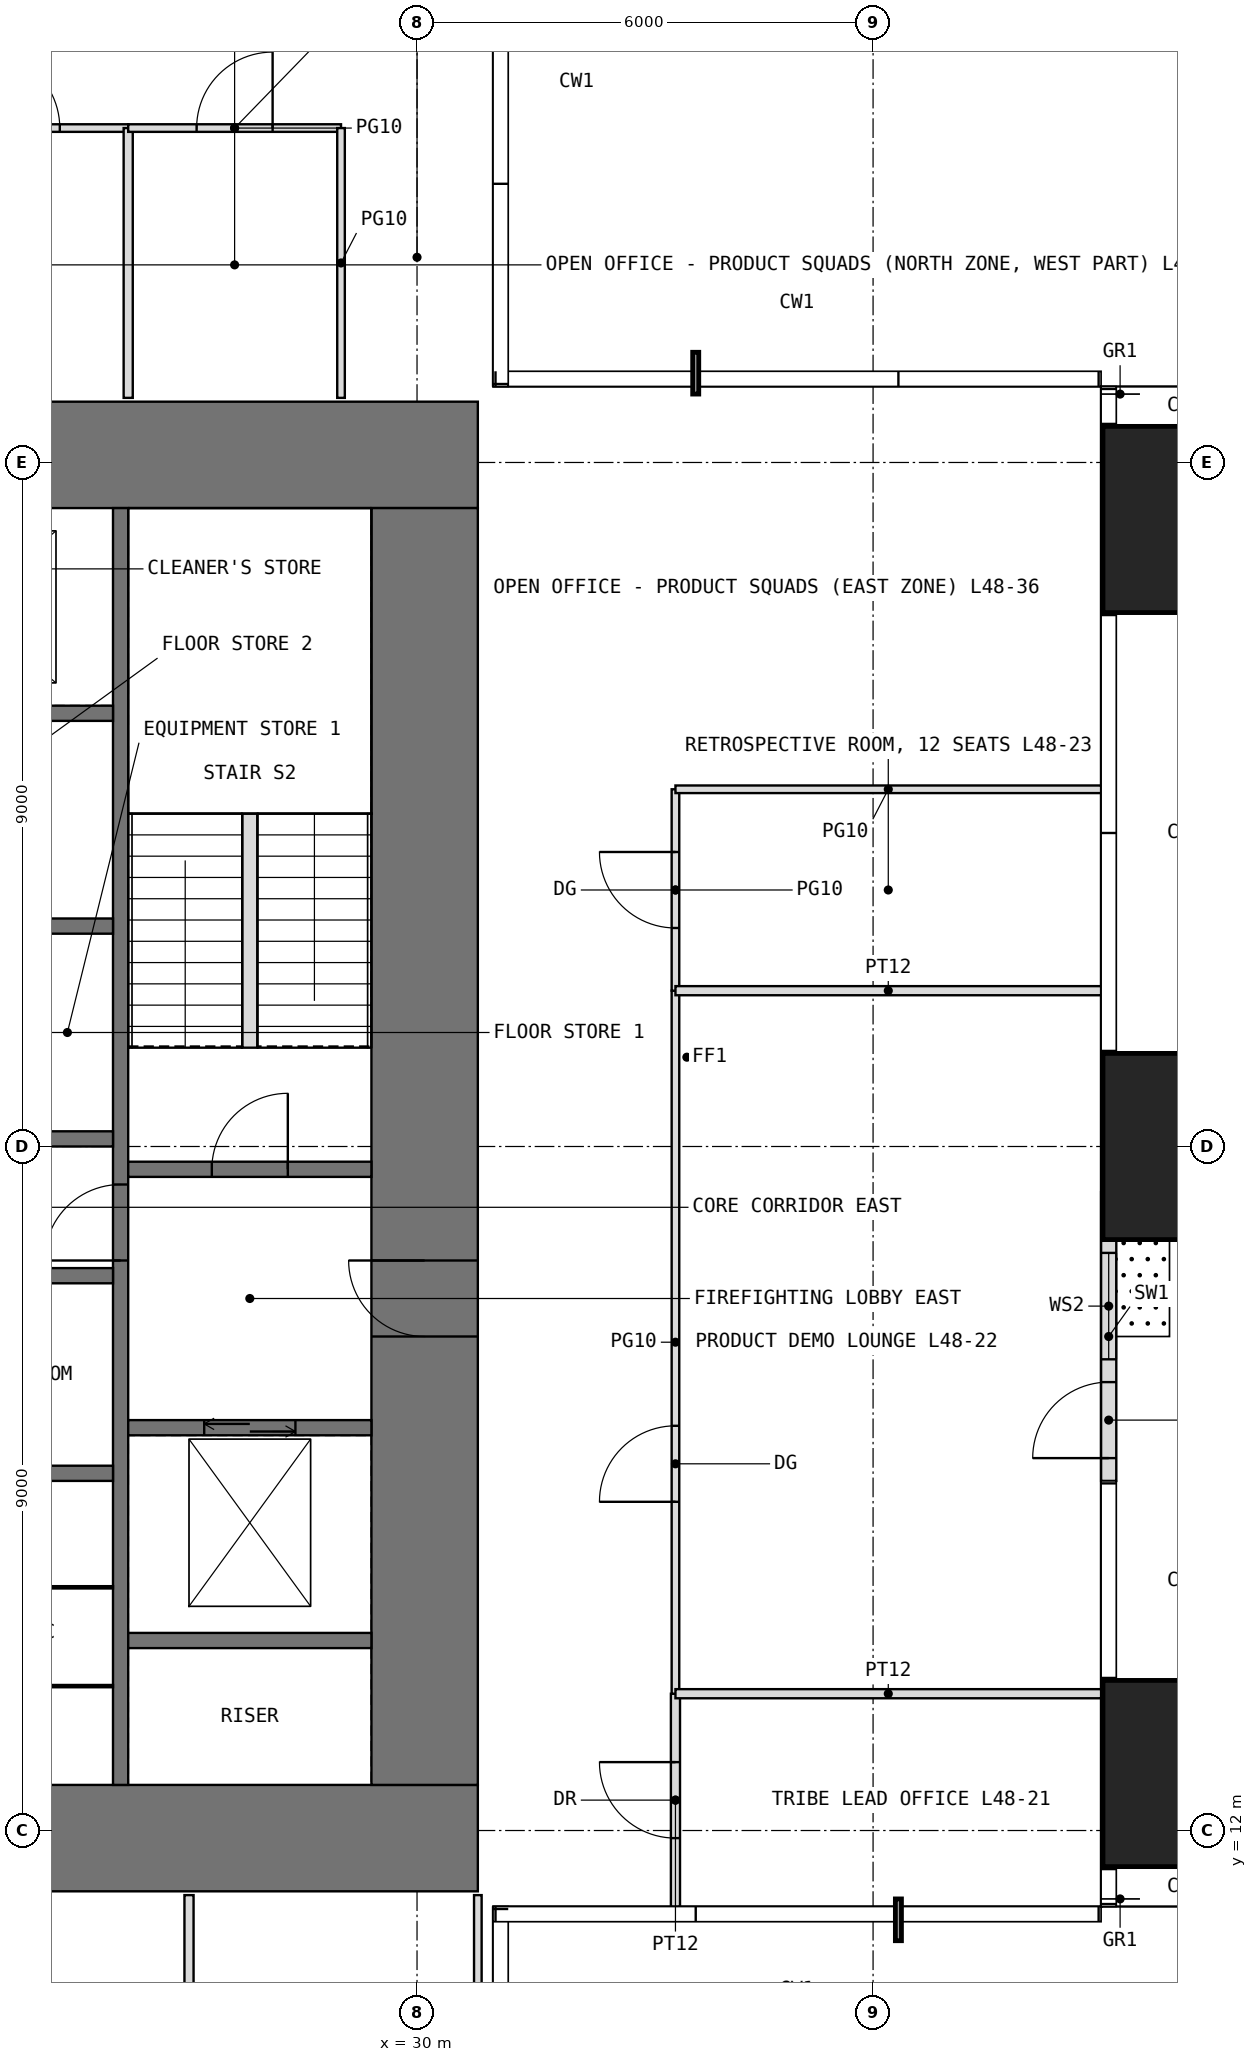
"""IFC4 building model, lengths in metres.
Left out: names, types, materials, properties, quantities, classifications, styles, units other than length and angle.
Written with IfcOpenShell. Run it as: python <this file> out.ifc"""

import sys

from ifc_helpers import new_model, si_unit, direction, frame, frame_2d, origin, origin_2d, place, context, subcontext, project, spatial, rectangle, extrude, element, fill, save


model = new_model("IFC4")
c1 = context("Model", 3, precision=1e-05, world=origin(), true_north=direction((0.0, 1.0)))
c2 = subcontext(c1, "Body", "Model", "MODEL_VIEW")
j1 = project(units=[si_unit("LENGTHUNIT", "METRE"), si_unit("PLANEANGLEUNIT", "RADIAN")], contexts=[c1])
p1 = place(None, origin())
s1 = spatial("IfcSite", under=j1, at=p1, CompositionType="ELEMENT")
p2 = place(p1, origin())
s2 = spatial("IfcBuilding", under=s1, at=p2, CompositionType="ELEMENT")
p3 = place(p2, frame((0.0, 0.0, 202.5)))
s3 = spatial("IfcBuildingStorey", under=s2, at=p3, CompositionType="ELEMENT", Elevation=202.5)
for number, where, z_axis, x_axis in (
    (1, (40.25, 12.75, 0.0), (0.0, 0.0, 1.0), (1.0, 0.0, 0.0)),
    (2, (40.25, 21.0, 0.0), (0.0, 0.0, 1.0), (1.0, 0.0, 0.0)),
    (3, (40.25, 29.25, 0.0), (0.0, 0.0, 1.0), (1.0, 0.0, 0.0)),
):
    element("IfcColumn", number, at=place(p3, frame(where, z_axis=z_axis, x_axis=x_axis)), inside=s3, PredefinedType="COLUMN", context=c2, shape_type="SweptSolid", body=[
        extrude(rectangle(XDim=2.45, YDim=2.45, at=origin_2d()), origin(), (0.0, 0.0, 1.0), 4.0),
    ])
p4 = place(p3, frame((39.1, 16.6, 0.0), z_axis=(0.0, 0.0, 1.0), x_axis=(0.0, 1.0, 0.0)))
e4 = element("IfcWall", 4, at=p4, inside=s3, PredefinedType="USERDEFINED", context=c2, shape_type="SweptSolid", body=[
    extrude(rectangle(XDim=3.8, YDim=0.2, at=frame_2d((1.9, 0.0))), origin(), (0.0, 0.0, 1.0), 3.75),
])
p5 = place(p4, frame((0.3, 0.0, 0.0)))
e5 = element("IfcOpeningElement", 5, at=p5, cuts=e4, PredefinedType="OPENING", context=c2, shape_type="SweptSolid", body=[
    extrude(rectangle(XDim=1.0, YDim=2.4, at=frame_2d((0.5, 1.2))), frame((0.0, 0.11, 0.0), z_axis=(0.0, -1.0, 0.0), x_axis=(1.0, 0.0, 0.0)), (0.0, 0.0, 1.0), 0.22),
])
p6 = place(p4, frame((1.6, 0.0, 0.3)))
e6 = element("IfcOpeningElement", 6, at=p6, cuts=e4, PredefinedType="OPENING", context=c2, shape_type="SweptSolid", body=[
    extrude(rectangle(XDim=1.4, YDim=2.7, at=frame_2d((0.7, 1.35))), frame((0.0, 0.11, 0.0), z_axis=(0.0, -1.0, 0.0), x_axis=(1.0, 0.0, 0.0)), (0.0, 0.0, 1.0), 0.22),
])
p7 = place(p3, frame((11.2, 11.9, -0.05), z_axis=(0.0, 0.0, 1.0), x_axis=(1.0, 0.0, 0.0)))
e7 = element("IfcWall", 7, at=p7, inside=s3, PredefinedType="SHEAR", context=c2, shape_type="SweptSolid", body=[
    extrude(rectangle(XDim=19.6, YDim=1.4, at=frame_2d((9.8, 0.0))), origin(), (0.0, 0.0, 1.0), 4.0),
])
p8 = place(p7, frame((8.8, 0.0, 0.05)))
e8 = element("IfcOpeningElement", 8, at=p8, cuts=e7, PredefinedType="OPENING", context=c2, shape_type="SweptSolid", body=[
    extrude(rectangle(XDim=2.0, YDim=2.2, at=frame_2d((1.0, 1.1))), frame((0.0, 0.71, 0.0), z_axis=(0.0, -1.0, 0.0), x_axis=(1.0, 0.0, 0.0)), (0.0, 0.0, 1.0), 1.42),
])
p9 = place(p3, frame((11.2, 30.1, -0.05), z_axis=(0.0, 0.0, 1.0), x_axis=(1.0, 0.0, 0.0)))
e9 = element("IfcWall", 9, at=p9, inside=s3, PredefinedType="SHEAR", context=c2, shape_type="SweptSolid", body=[
    extrude(rectangle(XDim=19.6, YDim=1.4, at=frame_2d((9.8, 0.0))), origin(), (0.0, 0.0, 1.0), 4.0),
])
p10 = place(p9, frame((8.8, 0.0, 0.05)))
e10 = element("IfcOpeningElement", 10, at=p10, cuts=e9, PredefinedType="OPENING", context=c2, shape_type="SweptSolid", body=[
    extrude(rectangle(XDim=2.0, YDim=2.2, at=frame_2d((1.0, 1.1))), frame((0.0, 0.71, 0.0), z_axis=(0.0, -1.0, 0.0), x_axis=(1.0, 0.0, 0.0)), (0.0, 0.0, 1.0), 1.42),
])
p11 = place(p3, frame((30.1, 12.6, -0.05), z_axis=(0.0, 0.0, 1.0), x_axis=(0.0, 1.0, 0.0)))
e11 = element("IfcWall", 11, at=p11, inside=s3, PredefinedType="SHEAR", context=c2, shape_type="SweptSolid", body=[
    extrude(rectangle(XDim=16.8, YDim=1.4, at=frame_2d((8.4, 0.0))), origin(), (0.0, 0.0, 1.0), 4.0),
])
p12 = place(p11, frame((5.9, 0.0, 0.05)))
e12 = element("IfcOpeningElement", 12, at=p12, cuts=e11, PredefinedType="OPENING", context=c2, shape_type="SweptSolid", body=[
    extrude(rectangle(XDim=1.0, YDim=2.2, at=frame_2d((0.5, 1.1))), frame((0.0, 0.71, 0.0), z_axis=(0.0, -1.0, 0.0), x_axis=(1.0, 0.0, 0.0)), (0.0, 0.0, 1.0), 1.42),
])
p13 = place(p3, frame((26.1, 12.6, -0.05), z_axis=(0.0, 0.0, 1.0), x_axis=(0.0, 1.0, 0.0)))
e13 = element("IfcWall", 13, at=p13, inside=s3, PredefinedType="SHEAR", context=c2, shape_type="SweptSolid", body=[
    extrude(rectangle(XDim=16.8, YDim=0.2, at=frame_2d((8.4, 0.0))), origin(), (0.0, 0.0, 1.0), 4.0),
])
p14 = place(p13, frame((6.9, 0.0, 0.05)))
e14 = element("IfcOpeningElement", 14, at=p14, cuts=e13, PredefinedType="OPENING", context=c2, shape_type="SweptSolid", body=[
    extrude(rectangle(XDim=1.0, YDim=2.2, at=frame_2d((0.5, 1.1))), frame((0.0, 0.11, 0.0), z_axis=(0.0, -1.0, 0.0), x_axis=(1.0, 0.0, 0.0)), (0.0, 0.0, 1.0), 0.22),
])
for number, where, z_axis, x_axis in (
    (15, (22.8, 16.7, -0.05), (0.0, 0.0, 1.0), (1.0, 0.0, 0.0)),
    (16, (22.8, 19.3, -0.05), (0.0, 0.0, 1.0), (1.0, 0.0, 0.0)),
    (17, (22.8, 21.1, -0.05), (0.0, 0.0, 1.0), (1.0, 0.0, 0.0)),
    (18, (22.8, 23.9, -0.05), (0.0, 0.0, 1.0), (1.0, 0.0, 0.0)),
    (19, (22.8, 26.7, -0.05), (0.0, 0.0, 1.0), (1.0, 0.0, 0.0)),
    (20, (26.2, 14.5, -0.05), (0.0, 0.0, 1.0), (1.0, 0.0, 0.0)),
):
    element("IfcWall", number, at=place(p3, frame(where, z_axis=z_axis, x_axis=x_axis)), inside=s3, PredefinedType="SHEAR", context=c2, shape_type="SweptSolid", body=[
        extrude(rectangle(XDim=3.2, YDim=0.2, at=frame_2d((1.6, 0.0))), origin(), (0.0, 0.0, 1.0), 4.0),
    ])
p15 = place(p3, frame((26.2, 17.3, -0.05), z_axis=(0.0, 0.0, 1.0), x_axis=(1.0, 0.0, 0.0)))
e21 = element("IfcWall", 21, at=p15, inside=s3, PredefinedType="SHEAR", context=c2, shape_type="SweptSolid", body=[
    extrude(rectangle(XDim=3.2, YDim=0.2, at=frame_2d((1.6, 0.0))), origin(), (0.0, 0.0, 1.0), 4.0),
])
p16 = place(p15, frame((1.0, 0.0, 0.05)))
e22 = element("IfcOpeningElement", 22, at=p16, cuts=e21, PredefinedType="OPENING", context=c2, shape_type="SweptSolid", body=[
    extrude(rectangle(XDim=1.2, YDim=2.2, at=frame_2d((0.6, 1.1))), frame((0.0, 0.11, 0.0), z_axis=(0.0, -1.0, 0.0), x_axis=(1.0, 0.0, 0.0)), (0.0, 0.0, 1.0), 0.22),
])
p17 = place(p3, frame((26.2, 20.7, -0.05), z_axis=(0.0, 0.0, 1.0), x_axis=(1.0, 0.0, 0.0)))
e23 = element("IfcWall", 23, at=p17, inside=s3, PredefinedType="SHEAR", context=c2, shape_type="SweptSolid", body=[
    extrude(rectangle(XDim=3.2, YDim=0.2, at=frame_2d((1.6, 0.0))), origin(), (0.0, 0.0, 1.0), 4.0),
])
p18 = place(p17, frame((1.1, 0.0, 0.05)))
e24 = element("IfcOpeningElement", 24, at=p18, cuts=e23, PredefinedType="OPENING", context=c2, shape_type="SweptSolid", body=[
    extrude(rectangle(XDim=1.0, YDim=2.2, at=frame_2d((0.5, 1.1))), frame((0.0, 0.11, 0.0), z_axis=(0.0, -1.0, 0.0), x_axis=(1.0, 0.0, 0.0)), (0.0, 0.0, 1.0), 0.22),
])
for number, where, z_axis, x_axis in (
    (25, (24.6, 13.9, 0.0), (0.0, 0.0, 1.0), (1.0, 0.0, 0.0)),
    (26, (24.6, 15.2, 0.0), (0.0, 0.0, 1.0), (1.0, 0.0, 0.0)),
):
    element("IfcWall", number, at=place(p3, frame(where, z_axis=z_axis, x_axis=x_axis)), inside=s3, PredefinedType="PARTITIONING", context=c2, shape_type="SweptSolid", body=[
        extrude(rectangle(XDim=1.4, YDim=0.03, at=frame_2d((0.7, 0.0))), origin(), (0.0, 0.0, 1.0), 3.75),
    ])
p19 = place(p3, frame((23.4, 34.4, 0.0), z_axis=(0.0, 0.0, 1.0), x_axis=(1.0, 0.0, 0.0)))
e27 = element("IfcWall", 27, at=p19, inside=s3, PredefinedType="PARTITIONING", context=c2, shape_type="SweptSolid", body=[
    extrude(rectangle(XDim=2.8, YDim=0.1, at=frame_2d((1.4, 0.0))), origin(), (0.0, 0.0, 1.0), 3.75),
])
p20 = place(p19, frame((0.9, 0.0, 0.0)))
e28 = element("IfcOpeningElement", 28, at=p20, cuts=e27, PredefinedType="OPENING", context=c2, shape_type="SweptSolid", body=[
    extrude(rectangle(XDim=1.0, YDim=2.4, at=frame_2d((0.5, 1.2))), frame((0.0, 0.06, 0.0), z_axis=(0.0, -1.0, 0.0), x_axis=(1.0, 0.0, 0.0)), (0.0, 0.0, 1.0), 0.12),
])
p21 = place(p3, frame((26.2, 30.85, 0.0), z_axis=(0.0, 0.0, 1.0), x_axis=(0.0, 1.0, 0.0)))
e29 = element("IfcWall", 29, at=p21, inside=s3, PredefinedType="PARTITIONING", context=c2, shape_type="SweptSolid", body=[
    extrude(rectangle(XDim=3.55, YDim=0.12, at=frame_2d((1.775, 0.0))), origin(), (0.0, 0.0, 1.0), 3.75),
])
p22 = place(p3, frame((26.2, 34.4, 0.0), z_axis=(0.0, 0.0, 1.0), x_axis=(1.0, 0.0, 0.0)))
e30 = element("IfcWall", 30, at=p22, inside=s3, PredefinedType="PARTITIONING", context=c2, shape_type="SweptSolid", body=[
    extrude(rectangle(XDim=2.8, YDim=0.1, at=frame_2d((1.4, 0.0))), origin(), (0.0, 0.0, 1.0), 3.75),
])
p23 = place(p22, frame((0.9, 0.0, 0.0)))
e31 = element("IfcOpeningElement", 31, at=p23, cuts=e30, PredefinedType="OPENING", context=c2, shape_type="SweptSolid", body=[
    extrude(rectangle(XDim=1.0, YDim=2.4, at=frame_2d((0.5, 1.2))), frame((0.0, 0.06, 0.0), z_axis=(0.0, -1.0, 0.0), x_axis=(1.0, 0.0, 0.0)), (0.0, 0.0, 1.0), 0.12),
])
p24 = place(p3, frame((27.0, 6.8, 0.0), z_axis=(0.0, 0.0, 1.0), x_axis=(0.0, 1.0, 0.0)))
e32 = element("IfcWall", 32, at=p24, inside=s3, PredefinedType="PARTITIONING", context=c2, shape_type="SweptSolid", body=[
    extrude(rectangle(XDim=4.35, YDim=0.12, at=frame_2d((2.175, 0.0))), origin(), (0.0, 0.0, 1.0), 3.75),
])
p25 = place(p3, frame((29.0, 30.85, 0.0), z_axis=(0.0, 0.0, 1.0), x_axis=(0.0, 1.0, 0.0)))
e33 = element("IfcWall", 33, at=p25, inside=s3, PredefinedType="PARTITIONING", context=c2, shape_type="SweptSolid", body=[
    extrude(rectangle(XDim=3.55, YDim=0.1, at=frame_2d((1.775, 0.0))), origin(), (0.0, 0.0, 1.0), 3.75),
])
p26 = place(p3, frame((30.8, 6.8, 0.0), z_axis=(0.0, 0.0, 1.0), x_axis=(0.0, 1.0, 0.0)))
e34 = element("IfcWall", 34, at=p26, inside=s3, PredefinedType="PARTITIONING", context=c2, shape_type="SweptSolid", body=[
    extrude(rectangle(XDim=4.35, YDim=0.1, at=frame_2d((2.175, 0.0))), origin(), (0.0, 0.0, 1.0), 3.75),
])
p27 = place(p3, frame((33.4, 11.0, 0.0), z_axis=(0.0, 0.0, 1.0), x_axis=(0.0, 1.0, 0.0)))
e35 = element("IfcWall", 35, at=p27, inside=s3, PredefinedType="PARTITIONING", context=c2, shape_type="SweptSolid", body=[
    extrude(rectangle(XDim=2.8, YDim=0.12, at=frame_2d((1.4, 0.0))), origin(), (0.0, 0.0, 1.0), 3.75),
])
p28 = place(p27, frame((0.9, 0.0, 0.0)))
e36 = element("IfcOpeningElement", 36, at=p28, cuts=e35, PredefinedType="OPENING", context=c2, shape_type="SweptSolid", body=[
    extrude(rectangle(XDim=1.0, YDim=2.2, at=frame_2d((0.5, 1.1))), frame((0.0, 0.07, 0.0), z_axis=(0.0, -1.0, 0.0), x_axis=(1.0, 0.0, 0.0)), (0.0, 0.0, 1.0), 0.14),
])
p29 = place(p3, frame((33.4, 13.8, 0.0), z_axis=(0.0, 0.0, 1.0), x_axis=(0.0, 1.0, 0.0)))
e37 = element("IfcWall", 37, at=p29, inside=s3, PredefinedType="PARTITIONING", context=c2, shape_type="SweptSolid", body=[
    extrude(rectangle(XDim=9.25, YDim=0.1, at=frame_2d((4.625, 0.0))), origin(), (0.0, 0.0, 1.0), 3.75),
])
p30 = place(p29, frame((2.525, 0.0, 0.0)))
e38 = element("IfcOpeningElement", 38, at=p30, cuts=e37, PredefinedType="OPENING", context=c2, shape_type="SweptSolid", body=[
    extrude(rectangle(XDim=1.0, YDim=2.4, at=frame_2d((0.5, 1.2))), frame((0.0, 0.06, 0.0), z_axis=(0.0, -1.0, 0.0), x_axis=(1.0, 0.0, 0.0)), (0.0, 0.0, 1.0), 0.12),
])
p31 = place(p3, frame((33.4, 13.8, 0.0), z_axis=(0.0, 0.0, 1.0), x_axis=(1.0, 0.0, 0.0)))
e39 = element("IfcWall", 39, at=p31, inside=s3, PredefinedType="PARTITIONING", context=c2, shape_type="SweptSolid", body=[
    extrude(rectangle(XDim=5.6, YDim=0.12, at=frame_2d((2.8, 0.0))), origin(), (0.0, 0.0, 1.0), 3.75),
])
p32 = place(p3, frame((33.4, 23.05, 0.0), z_axis=(0.0, 0.0, 1.0), x_axis=(0.0, 1.0, 0.0)))
e40 = element("IfcWall", 40, at=p32, inside=s3, PredefinedType="PARTITIONING", context=c2, shape_type="SweptSolid", body=[
    extrude(rectangle(XDim=2.65, YDim=0.1, at=frame_2d((1.325, 0.0))), origin(), (0.0, 0.0, 1.0), 3.75),
])
p33 = place(p32, frame((0.825, 0.0, 0.0)))
e41 = element("IfcOpeningElement", 41, at=p33, cuts=e40, PredefinedType="OPENING", context=c2, shape_type="SweptSolid", body=[
    extrude(rectangle(XDim=1.0, YDim=2.4, at=frame_2d((0.5, 1.2))), frame((0.0, 0.06, 0.0), z_axis=(0.0, -1.0, 0.0), x_axis=(1.0, 0.0, 0.0)), (0.0, 0.0, 1.0), 0.12),
])
p34 = place(p3, frame((33.4, 23.05, 0.0), z_axis=(0.0, 0.0, 1.0), x_axis=(1.0, 0.0, 0.0)))
e42 = element("IfcWall", 42, at=p34, inside=s3, PredefinedType="PARTITIONING", context=c2, shape_type="SweptSolid", body=[
    extrude(rectangle(XDim=5.6, YDim=0.12, at=frame_2d((2.8, 0.0))), origin(), (0.0, 0.0, 1.0), 3.75),
])
p35 = place(p3, frame((33.4, 25.7, 0.0), z_axis=(0.0, 0.0, 1.0), x_axis=(1.0, 0.0, 0.0)))
e43 = element("IfcWall", 43, at=p35, inside=s3, PredefinedType="PARTITIONING", context=c2, shape_type="SweptSolid", body=[
    extrude(rectangle(XDim=5.6, YDim=0.1, at=frame_2d((2.8, 0.0))), origin(), (0.0, 0.0, 1.0), 3.75),
])
p36 = place(p3, frame((27.8, 22.3, 0.0), z_axis=(0.0, 0.0, 1.0), x_axis=(0.0, 1.0, 0.0)))
e44 = element("IfcWall", 44, at=p36, inside=s3, PredefinedType="PARTITIONING", context=c2, shape_type="SweptSolid", body=[
    extrude(rectangle(XDim=3.08, YDim=0.2, at=frame_2d((1.54, 0.0))), origin(), (0.0, 0.0, 1.0), 4.0),
])
p37 = place(p5, origin())
e45 = element("IfcDoor", 45, at=p37, inside=s3, OperationType="SINGLE_SWING_LEFT", PredefinedType="DOOR", context=c2, shape_type="SweptSolid", body=[
    extrude(rectangle(XDim=1.0, YDim=2.4, at=frame_2d((0.5, 1.2))), frame((0.0, 0.025, 0.0), z_axis=(0.0, -1.0, 0.0), x_axis=(1.0, 0.0, 0.0)), (0.0, 0.0, 1.0), 0.05),
])
fill(e5, e45)
p38 = place(p6, origin())
e46 = element("IfcWindow", 46, at=p38, inside=s3, PartitioningType="SINGLE_PANEL", PredefinedType="WINDOW", context=c2, shape_type="SweptSolid", body=[
    extrude(rectangle(XDim=1.4, YDim=2.7, at=frame_2d((0.7, 1.35))), frame((0.0, 0.03, 0.0), z_axis=(0.0, -1.0, 0.0), x_axis=(1.0, 0.0, 0.0)), (0.0, 0.0, 1.0), 0.06),
])
fill(e6, e46)
p39 = place(p12, origin())
e47 = element("IfcDoor", 47, at=p39, inside=s3, OperationType="SINGLE_SWING_RIGHT", PredefinedType="DOOR", context=c2, shape_type="SweptSolid", body=[
    extrude(rectangle(XDim=1.0, YDim=2.2, at=frame_2d((0.5, 1.1))), frame((0.0, 0.025, 0.0), z_axis=(0.0, -1.0, 0.0), x_axis=(1.0, 0.0, 0.0)), (0.0, 0.0, 1.0), 0.05),
])
fill(e12, e47)
p40 = place(p18, origin())
e48 = element("IfcDoor", 48, at=p40, inside=s3, OperationType="SINGLE_SWING_RIGHT", PredefinedType="DOOR", context=c2, shape_type="SweptSolid", body=[
    extrude(rectangle(XDim=1.0, YDim=2.2, at=frame_2d((0.5, 1.1))), frame((0.0, 0.025, 0.0), z_axis=(0.0, -1.0, 0.0), x_axis=(1.0, 0.0, 0.0)), (0.0, 0.0, 1.0), 0.05),
])
fill(e24, e48)
p41 = place(p14, origin())
e49 = element("IfcDoor", 49, at=p41, inside=s3, OperationType="SINGLE_SWING_LEFT", PredefinedType="DOOR", context=c2, shape_type="SweptSolid", body=[
    extrude(rectangle(XDim=1.0, YDim=2.2, at=frame_2d((0.5, 1.1))), frame((0.0, 0.025, 0.0), z_axis=(0.0, -1.0, 0.0), x_axis=(1.0, 0.0, 0.0)), (0.0, 0.0, 1.0), 0.05),
])
fill(e14, e49)
p42 = place(p28, origin())
e50 = element("IfcDoor", 50, at=p42, inside=s3, OperationType="SINGLE_SWING_RIGHT", PredefinedType="DOOR", context=c2, shape_type="SweptSolid", body=[
    extrude(rectangle(XDim=1.0, YDim=2.2, at=frame_2d((0.5, 1.1))), frame((0.0, 0.025, 0.0), z_axis=(0.0, -1.0, 0.0), x_axis=(1.0, 0.0, 0.0)), (0.0, 0.0, 1.0), 0.05),
])
fill(e36, e50)
p43 = place(p30, origin())
e51 = element("IfcDoor", 51, at=p43, inside=s3, OperationType="SINGLE_SWING_LEFT", PredefinedType="DOOR", context=c2, shape_type="SweptSolid", body=[
    extrude(rectangle(XDim=1.0, YDim=2.4, at=frame_2d((0.5, 1.2))), frame((0.0, 0.025, 0.0), z_axis=(0.0, -1.0, 0.0), x_axis=(1.0, 0.0, 0.0)), (0.0, 0.0, 1.0), 0.05),
])
fill(e38, e51)
p44 = place(p33, origin())
e52 = element("IfcDoor", 52, at=p44, inside=s3, OperationType="SINGLE_SWING_RIGHT", PredefinedType="DOOR", context=c2, shape_type="SweptSolid", body=[
    extrude(rectangle(XDim=1.0, YDim=2.4, at=frame_2d((0.5, 1.2))), frame((0.0, 0.025, 0.0), z_axis=(0.0, -1.0, 0.0), x_axis=(1.0, 0.0, 0.0)), (0.0, 0.0, 1.0), 0.05),
])
fill(e41, e52)
p45 = place(p20, origin())
e53 = element("IfcDoor", 53, at=p45, inside=s3, OperationType="SINGLE_SWING_LEFT", PredefinedType="DOOR", context=c2, shape_type="SweptSolid", body=[
    extrude(rectangle(XDim=1.0, YDim=2.4, at=frame_2d((0.5, 1.2))), frame((0.0, 0.025, 0.0), z_axis=(0.0, -1.0, 0.0), x_axis=(1.0, 0.0, 0.0)), (0.0, 0.0, 1.0), 0.05),
])
fill(e28, e53)
p46 = place(p23, origin())
e54 = element("IfcDoor", 54, at=p46, inside=s3, OperationType="SINGLE_SWING_RIGHT", PredefinedType="DOOR", context=c2, shape_type="SweptSolid", body=[
    extrude(rectangle(XDim=1.0, YDim=2.4, at=frame_2d((0.5, 1.2))), frame((0.0, 0.025, 0.0), z_axis=(0.0, -1.0, 0.0), x_axis=(1.0, 0.0, 0.0)), (0.0, 0.0, 1.0), 0.05),
])
fill(e31, e54)
p47 = place(p16, origin())
e55 = element("IfcDoor", 55, at=p47, inside=s3, OperationType="DOUBLE_DOOR_SLIDING", PredefinedType="DOOR", context=c2, shape_type="SweptSolid", body=[
    extrude(rectangle(XDim=1.2, YDim=2.2, at=frame_2d((0.6, 1.1))), frame((0.0, 0.025, 0.0), z_axis=(0.0, -1.0, 0.0), x_axis=(1.0, 0.0, 0.0)), (0.0, 0.0, 1.0), 0.05),
])
fill(e22, e55)
save(model, sys.argv[1])
